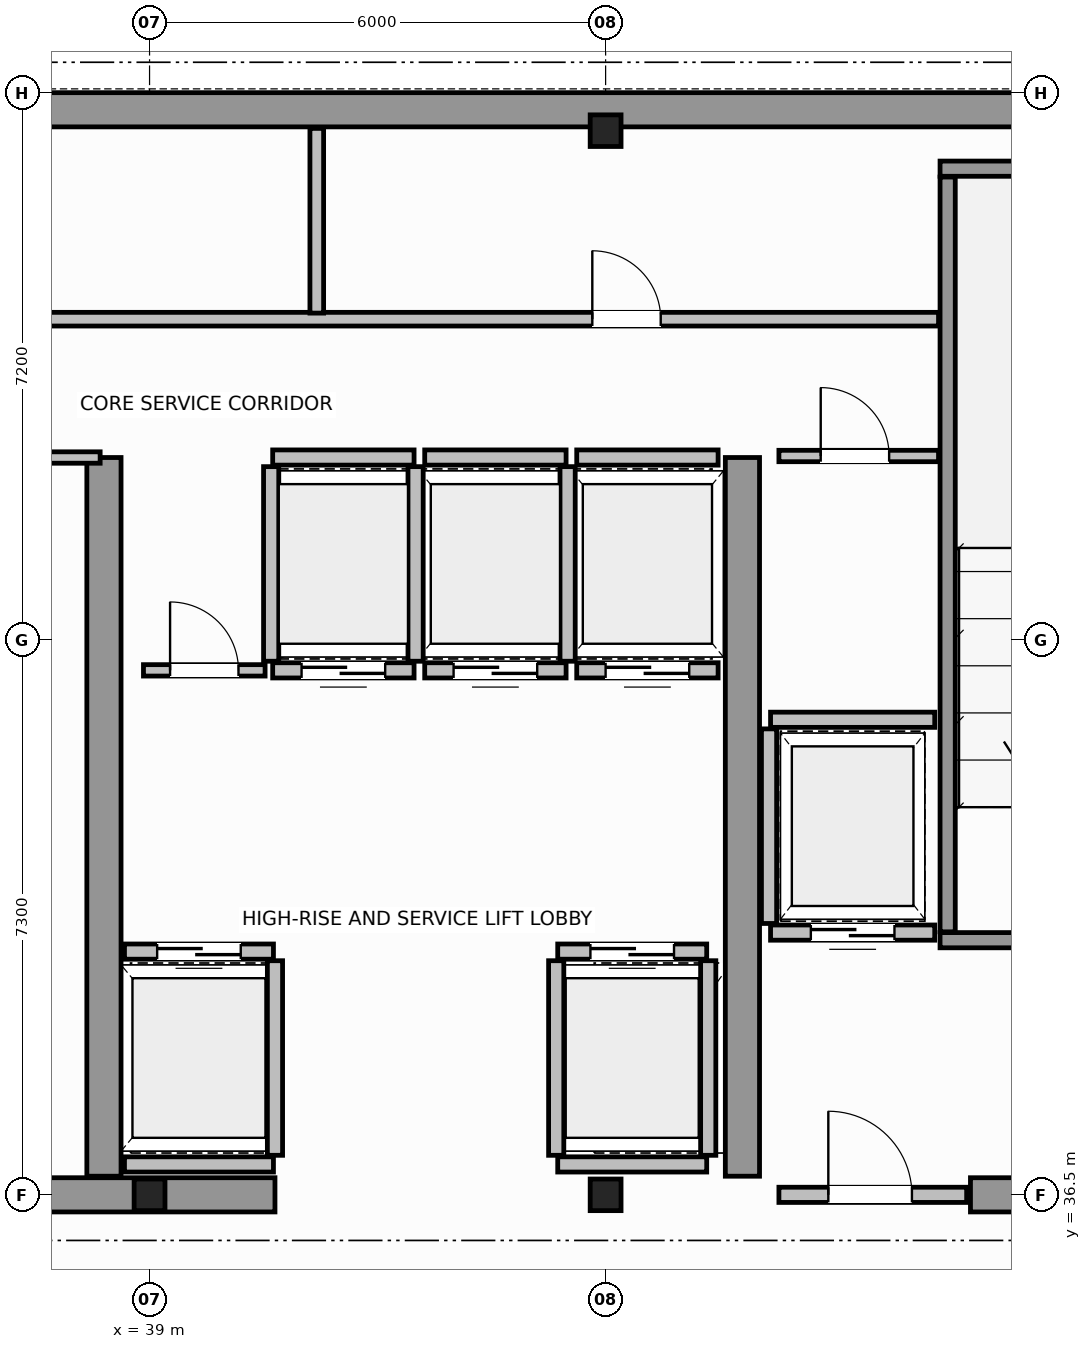
"""IFC4 building model, lengths in metres.
Left out: names, types, materials, properties, quantities, classifications, styles, units other than length and angle.
Written with IfcOpenShell. Run it as: python <this file> out.ifc"""

import sys

from ifc_helpers import new_model, si_unit, direction, frame, frame_2d, origin, origin_2d, place, context, subcontext, project, spatial, rectangle, i_section, extrude, source, transform, mapped, element, fill, save


model = new_model("IFC4")
c1 = context("Model", 3, precision=1e-05, world=origin(), true_north=direction((0.0, 1.0)))
c2 = subcontext(c1, "Body", "Model", "MODEL_VIEW")
j1 = project(units=[si_unit("LENGTHUNIT", "METRE"), si_unit("PLANEANGLEUNIT", "RADIAN")], contexts=[c1])
p1 = place(None, origin())
s1 = spatial("IfcSite", under=j1, at=p1, CompositionType="ELEMENT")
p2 = place(p1, origin())
s2 = spatial("IfcBuilding", under=s1, at=p2, CompositionType="ELEMENT")
p3 = place(p2, frame((0.0, 0.0, 284.0)))
s3 = spatial("IfcBuildingStorey", under=s2, at=p3, CompositionType="ELEMENT", Elevation=284.0)
m1 = source(origin(), c2, "Body", "SweptSolid", [
    extrude(i_section(OverallWidth=0.406, OverallDepth=0.416, WebThickness=0.03, FlangeThickness=0.042, FilletRadius=0.015, at=origin_2d()), origin(), (0.0, 0.0, 1.0), 3.8),
])
for number, where, z_axis, x_axis in (
    (1, (39.0, 36.5, 0.0), (0.0, 0.0, 1.0), (1.0, 0.0, 0.0)),
    (2, (45.0, 36.5, 0.0), (0.0, 0.0, 1.0), (1.0, 0.0, 0.0)),
    (3, (45.0, 50.5, 0.0), (0.0, 0.0, 1.0), (1.0, 0.0, 0.0)),
):
    element("IfcColumn", number, at=place(p3, frame(where, z_axis=z_axis, x_axis=x_axis)), inside=s3, PredefinedType="COLUMN", context=c2, shape_type="MappedRepresentation", body=[
        mapped(m1, transform((0.0, 0.0, 0.0), scale=1.0)),
    ])
p4 = place(p3, frame((34.002, 50.775, 0.0), z_axis=(0.0, 0.0, 1.0), x_axis=(1.0, 0.0, 0.0)))
e4 = element("IfcWall", 4, at=p4, inside=s3, PredefinedType="SHEAR", context=c2, shape_type="SweptSolid", body=[
    extrude(rectangle(XDim=19.769, YDim=0.45, at=frame_2d((9.885, 0.0))), origin(), (0.0, 0.0, 1.0), 3.8),
])
p5 = place(p3, frame((36.15, 36.5, 0.0), z_axis=(0.0, 0.0, 1.0), x_axis=(1.0, 0.0, 0.0)))
e5 = element("IfcWall", 5, at=p5, inside=s3, PredefinedType="SHEAR", context=c2, shape_type="SweptSolid", body=[
    extrude(rectangle(XDim=4.5, YDim=0.45, at=frame_2d((2.25, 0.0))), origin(), (0.0, 0.0, 1.0), 3.8),
])
p6 = place(p3, frame((49.8, 36.5, 0.0), z_axis=(0.0, 0.0, 1.0), x_axis=(1.0, 0.0, 0.0)))
e6 = element("IfcWall", 6, at=p6, inside=s3, PredefinedType="SHEAR", context=c2, shape_type="SweptSolid", body=[
    extrude(rectangle(XDim=3.955, YDim=0.45, at=frame_2d((1.978, 0.0))), origin(), (0.0, 0.0, 1.0), 2.58),
])
for number, where, z_axis, x_axis in (
    (7, (38.4, 36.745, 0.0), (0.0, 0.0, 1.0), (0.0, 1.0, 0.0)),
    (8, (46.8, 36.745, 0.0), (0.0, 0.0, 1.0), (0.0, 1.0, 0.0)),
):
    element("IfcWall", number, at=place(p3, frame(where, z_axis=z_axis, x_axis=x_axis)), inside=s3, PredefinedType="SHEAR", context=c2, shape_type="SweptSolid", body=[
        extrude(rectangle(XDim=9.455, YDim=0.45, at=frame_2d((4.728, 0.0))), origin(), (0.0, 0.0, 1.0), 3.8),
    ])
p7 = place(p3, frame((49.4, 39.85, 0.0), z_axis=(0.0, 0.0, 1.0), x_axis=(1.0, 0.0, 0.0)))
e9 = element("IfcWall", 9, at=p7, inside=s3, PredefinedType="SOLIDWALL", context=c2, shape_type="SweptSolid", body=[
    extrude(rectangle(XDim=4.375, YDim=0.2, at=frame_2d((2.188, 0.0))), origin(), (0.0, 0.0, 1.0), 3.8),
])
p8 = place(p7, frame((1.325, 0.0, 0.0)))
e10 = element("IfcOpeningElement", 10, at=p8, cuts=e9, PredefinedType="OPENING", context=c2, shape_type="SweptSolid", body=[
    extrude(rectangle(XDim=1.1, YDim=2.15, at=frame_2d((0.55, 1.075))), frame((0.0, 0.11, 0.0), z_axis=(0.0, -1.0, 0.0), x_axis=(1.0, 0.0, 0.0)), (0.0, 0.0, 1.0), 0.22),
])
p9 = place(p3, frame((49.4, 50.0, 0.0), z_axis=(0.0, 0.0, 1.0), x_axis=(1.0, 0.0, 0.0)))
e11 = element("IfcWall", 11, at=p9, inside=s3, PredefinedType="SOLIDWALL", context=c2, shape_type="SweptSolid", body=[
    extrude(rectangle(XDim=4.375, YDim=0.2, at=frame_2d((2.188, 0.0))), origin(), (0.0, 0.0, 1.0), 3.8),
])
p10 = place(p3, frame((49.5, 39.96, 0.0), z_axis=(0.0, 0.0, 1.0), x_axis=(0.0, 1.0, 0.0)))
e12 = element("IfcWall", 12, at=p10, inside=s3, PredefinedType="SOLIDWALL", context=c2, shape_type="SweptSolid", body=[
    extrude(rectangle(XDim=9.93, YDim=0.2, at=frame_2d((4.965, 0.0))), origin(), (0.0, 0.0, 1.0), 3.8),
])
p11 = place(p3, frame((47.28, 36.5, 0.0), z_axis=(0.0, 0.0, 1.0), x_axis=(1.0, 0.0, 0.0)))
e13 = element("IfcWall", 13, at=p11, inside=s3, PredefinedType="SOLIDWALL", context=c2, shape_type="SweptSolid", body=[
    extrude(rectangle(XDim=2.47, YDim=0.2, at=frame_2d((1.235, 0.0))), origin(), (0.0, 0.0, 1.0), 2.57),
])
p12 = place(p11, frame((0.65, 0.0, 0.0)))
e14 = element("IfcOpeningElement", 14, at=p12, cuts=e13, PredefinedType="OPENING", context=c2, shape_type="SweptSolid", body=[
    extrude(rectangle(XDim=1.1, YDim=2.15, at=frame_2d((0.55, 1.075))), frame((0.0, 0.11, 0.0), z_axis=(0.0, -1.0, 0.0), x_axis=(1.0, 0.0, 0.0)), (0.0, 0.0, 1.0), 0.22),
])
p13 = place(p3, frame((38.67, 39.7, 0.0), z_axis=(0.0, 0.0, 1.0), x_axis=(1.0, 0.0, 0.0)))
e15 = element("IfcWall", 15, at=p13, inside=s3, PredefinedType="SOLIDWALL", context=c2, shape_type="SweptSolid", body=[
    extrude(rectangle(XDim=1.96, YDim=0.2, at=frame_2d((0.98, 0.0))), origin(), (0.0, 0.0, 1.0), 3.58),
])
p14 = place(p13, frame((0.43, 0.0, 0.0)))
e16 = element("IfcOpeningElement", 16, at=p14, cuts=e15, PredefinedType="OPENING", context=c2, shape_type="SweptSolid", body=[
    extrude(rectangle(XDim=1.1, YDim=2.15, at=frame_2d((0.55, 1.075))), frame((0.0, 0.11, 0.0), z_axis=(0.0, -1.0, 0.0), x_axis=(1.0, 0.0, 0.0)), (0.0, 0.0, 1.0), 0.22),
])
p15 = place(p3, frame((38.67, 36.9, 0.0), z_axis=(0.0, 0.0, 1.0), x_axis=(1.0, 0.0, 0.0)))
e17 = element("IfcWall", 17, at=p15, inside=s3, PredefinedType="SOLIDWALL", context=c2, shape_type="SweptSolid", body=[
    extrude(rectangle(XDim=1.96, YDim=0.2, at=frame_2d((0.98, 0.0))), origin(), (0.0, 0.0, 1.0), 3.58),
])
p16 = place(p3, frame((40.65, 37.02, 0.0), z_axis=(0.0, 0.0, 1.0), x_axis=(0.0, 1.0, 0.0)))
e18 = element("IfcWall", 18, at=p16, inside=s3, PredefinedType="SOLIDWALL", context=c2, shape_type="SweptSolid", body=[
    extrude(rectangle(XDim=2.56, YDim=0.2, at=frame_2d((1.28, 0.0))), origin(), (0.0, 0.0, 1.0), 3.58),
])
p17 = place(p3, frame((44.37, 39.7, 0.0), z_axis=(0.0, 0.0, 1.0), x_axis=(1.0, 0.0, 0.0)))
e19 = element("IfcWall", 19, at=p17, inside=s3, PredefinedType="SOLIDWALL", context=c2, shape_type="SweptSolid", body=[
    extrude(rectangle(XDim=1.96, YDim=0.2, at=frame_2d((0.98, 0.0))), origin(), (0.0, 0.0, 1.0), 3.58),
])
p18 = place(p17, frame((0.43, 0.0, 0.0)))
e20 = element("IfcOpeningElement", 20, at=p18, cuts=e19, PredefinedType="OPENING", context=c2, shape_type="SweptSolid", body=[
    extrude(rectangle(XDim=1.1, YDim=2.15, at=frame_2d((0.55, 1.075))), frame((0.0, 0.11, 0.0), z_axis=(0.0, -1.0, 0.0), x_axis=(1.0, 0.0, 0.0)), (0.0, 0.0, 1.0), 0.22),
])
p19 = place(p3, frame((44.37, 36.9, 0.0), z_axis=(0.0, 0.0, 1.0), x_axis=(1.0, 0.0, 0.0)))
e21 = element("IfcWall", 21, at=p19, inside=s3, PredefinedType="SOLIDWALL", context=c2, shape_type="SweptSolid", body=[
    extrude(rectangle(XDim=1.96, YDim=0.2, at=frame_2d((0.98, 0.0))), origin(), (0.0, 0.0, 1.0), 2.57),
])
for number, where, z_axis, x_axis in (
    (22, (44.35, 37.02, 0.0), (0.0, 0.0, 1.0), (0.0, 1.0, 0.0)),
    (23, (46.35, 37.02, 0.0), (0.0, 0.0, 1.0), (0.0, 1.0, 0.0)),
):
    element("IfcWall", number, at=place(p3, frame(where, z_axis=z_axis, x_axis=x_axis)), inside=s3, PredefinedType="SOLIDWALL", context=c2, shape_type="SweptSolid", body=[
        extrude(rectangle(XDim=2.56, YDim=0.2, at=frame_2d((1.28, 0.0))), origin(), (0.0, 0.0, 1.0), 3.58),
    ])
p20 = place(p3, frame((40.62, 43.4, 0.0), z_axis=(0.0, 0.0, 1.0), x_axis=(1.0, 0.0, 0.0)))
e24 = element("IfcWall", 24, at=p20, inside=s3, PredefinedType="SOLIDWALL", context=c2, shape_type="SweptSolid", body=[
    extrude(rectangle(XDim=1.86, YDim=0.2, at=frame_2d((0.93, 0.0))), origin(), (0.0, 0.0, 1.0), 3.58),
])
p21 = place(p20, frame((0.38, 0.0, 0.0)))
e25 = element("IfcOpeningElement", 25, at=p21, cuts=e24, PredefinedType="OPENING", context=c2, shape_type="SweptSolid", body=[
    extrude(rectangle(XDim=1.1, YDim=2.15, at=frame_2d((0.55, 1.075))), frame((0.0, 0.11, 0.0), z_axis=(0.0, -1.0, 0.0), x_axis=(1.0, 0.0, 0.0)), (0.0, 0.0, 1.0), 0.22),
])
p22 = place(p3, frame((40.62, 46.2, 0.0), z_axis=(0.0, 0.0, 1.0), x_axis=(1.0, 0.0, 0.0)))
e26 = element("IfcWall", 26, at=p22, inside=s3, PredefinedType="SOLIDWALL", context=c2, shape_type="SweptSolid", body=[
    extrude(rectangle(XDim=1.86, YDim=0.2, at=frame_2d((0.93, 0.0))), origin(), (0.0, 0.0, 1.0), 3.58),
])
for number, where, z_axis, x_axis in (
    (27, (40.6, 43.52, 0.0), (0.0, 0.0, 1.0), (0.0, 1.0, 0.0)),
    (28, (42.5, 43.52, 0.0), (0.0, 0.0, 1.0), (0.0, 1.0, 0.0)),
):
    element("IfcWall", number, at=place(p3, frame(where, z_axis=z_axis, x_axis=x_axis)), inside=s3, PredefinedType="SOLIDWALL", context=c2, shape_type="SweptSolid", body=[
        extrude(rectangle(XDim=2.56, YDim=0.2, at=frame_2d((1.28, 0.0))), origin(), (0.0, 0.0, 1.0), 3.58),
    ])
p23 = place(p3, frame((42.62, 43.4, 0.0), z_axis=(0.0, 0.0, 1.0), x_axis=(1.0, 0.0, 0.0)))
e29 = element("IfcWall", 29, at=p23, inside=s3, PredefinedType="SOLIDWALL", context=c2, shape_type="SweptSolid", body=[
    extrude(rectangle(XDim=1.86, YDim=0.2, at=frame_2d((0.93, 0.0))), origin(), (0.0, 0.0, 1.0), 3.58),
])
p24 = place(p23, frame((0.38, 0.0, 0.0)))
e30 = element("IfcOpeningElement", 30, at=p24, cuts=e29, PredefinedType="OPENING", context=c2, shape_type="SweptSolid", body=[
    extrude(rectangle(XDim=1.1, YDim=2.15, at=frame_2d((0.55, 1.075))), frame((0.0, 0.11, 0.0), z_axis=(0.0, -1.0, 0.0), x_axis=(1.0, 0.0, 0.0)), (0.0, 0.0, 1.0), 0.22),
])
p25 = place(p3, frame((42.62, 46.2, 0.0), z_axis=(0.0, 0.0, 1.0), x_axis=(1.0, 0.0, 0.0)))
e31 = element("IfcWall", 31, at=p25, inside=s3, PredefinedType="SOLIDWALL", context=c2, shape_type="SweptSolid", body=[
    extrude(rectangle(XDim=1.86, YDim=0.2, at=frame_2d((0.93, 0.0))), origin(), (0.0, 0.0, 1.0), 3.58),
])
p26 = place(p3, frame((44.5, 43.52, 0.0), z_axis=(0.0, 0.0, 1.0), x_axis=(0.0, 1.0, 0.0)))
e32 = element("IfcWall", 32, at=p26, inside=s3, PredefinedType="SOLIDWALL", context=c2, shape_type="SweptSolid", body=[
    extrude(rectangle(XDim=2.56, YDim=0.2, at=frame_2d((1.28, 0.0))), origin(), (0.0, 0.0, 1.0), 3.58),
])
p27 = place(p3, frame((44.62, 43.4, 0.0), z_axis=(0.0, 0.0, 1.0), x_axis=(1.0, 0.0, 0.0)))
e33 = element("IfcWall", 33, at=p27, inside=s3, PredefinedType="SOLIDWALL", context=c2, shape_type="SweptSolid", body=[
    extrude(rectangle(XDim=1.86, YDim=0.2, at=frame_2d((0.93, 0.0))), origin(), (0.0, 0.0, 1.0), 3.58),
])
p28 = place(p27, frame((0.38, 0.0, 0.0)))
e34 = element("IfcOpeningElement", 34, at=p28, cuts=e33, PredefinedType="OPENING", context=c2, shape_type="SweptSolid", body=[
    extrude(rectangle(XDim=1.1, YDim=2.15, at=frame_2d((0.55, 1.075))), frame((0.0, 0.11, 0.0), z_axis=(0.0, -1.0, 0.0), x_axis=(1.0, 0.0, 0.0)), (0.0, 0.0, 1.0), 0.22),
])
p29 = place(p3, frame((44.62, 46.2, 0.0), z_axis=(0.0, 0.0, 1.0), x_axis=(1.0, 0.0, 0.0)))
e35 = element("IfcWall", 35, at=p29, inside=s3, PredefinedType="SOLIDWALL", context=c2, shape_type="SweptSolid", body=[
    extrude(rectangle(XDim=1.86, YDim=0.2, at=frame_2d((0.93, 0.0))), origin(), (0.0, 0.0, 1.0), 3.58),
])
p30 = place(p3, frame((47.17, 39.95, 0.0), z_axis=(0.0, 0.0, 1.0), x_axis=(1.0, 0.0, 0.0)))
e36 = element("IfcWall", 36, at=p30, inside=s3, PredefinedType="SOLIDWALL", context=c2, shape_type="SweptSolid", body=[
    extrude(rectangle(XDim=2.16, YDim=0.2, at=frame_2d((1.08, 0.0))), origin(), (0.0, 0.0, 1.0), 3.58),
])
p31 = place(p30, frame((0.53, 0.0, 0.0)))
e37 = element("IfcOpeningElement", 37, at=p31, cuts=e36, PredefinedType="OPENING", context=c2, shape_type="SweptSolid", body=[
    extrude(rectangle(XDim=1.1, YDim=2.15, at=frame_2d((0.55, 1.075))), frame((0.0, 0.11, 0.0), z_axis=(0.0, -1.0, 0.0), x_axis=(1.0, 0.0, 0.0)), (0.0, 0.0, 1.0), 0.22),
])
p32 = place(p3, frame((47.17, 42.75, 0.0), z_axis=(0.0, 0.0, 1.0), x_axis=(1.0, 0.0, 0.0)))
e38 = element("IfcWall", 38, at=p32, inside=s3, PredefinedType="SOLIDWALL", context=c2, shape_type="SweptSolid", body=[
    extrude(rectangle(XDim=2.16, YDim=0.2, at=frame_2d((1.08, 0.0))), origin(), (0.0, 0.0, 1.0), 3.58),
])
p33 = place(p3, frame((47.15, 40.07, 0.0), z_axis=(0.0, 0.0, 1.0), x_axis=(0.0, 1.0, 0.0)))
e39 = element("IfcWall", 39, at=p33, inside=s3, PredefinedType="SOLIDWALL", context=c2, shape_type="SweptSolid", body=[
    extrude(rectangle(XDim=2.56, YDim=0.2, at=frame_2d((1.28, 0.0))), origin(), (0.0, 0.0, 1.0), 3.58),
])
p34 = place(p3, frame((29.85, 46.2, 0.0), z_axis=(0.0, 0.0, 1.0), x_axis=(1.0, 0.0, 0.0)))
e40 = element("IfcWall", 40, at=p34, inside=s3, PredefinedType="PARTITIONING", context=c2, shape_type="SweptSolid", body=[
    extrude(rectangle(XDim=8.5, YDim=0.15, at=frame_2d((4.25, 0.0))), origin(), (0.0, 0.0, 1.0), 3.58),
])
p35 = place(p3, frame((47.28, 46.22, 0.0), z_axis=(0.0, 0.0, 1.0), x_axis=(1.0, 0.0, 0.0)))
e41 = element("IfcWall", 41, at=p35, inside=s3, PredefinedType="PARTITIONING", context=c2, shape_type="SweptSolid", body=[
    extrude(rectangle(XDim=2.1, YDim=0.15, at=frame_2d((1.05, 0.0))), origin(), (0.0, 0.0, 1.0), 3.58),
])
p36 = place(p35, frame((0.55, 0.0, 0.0)))
e42 = element("IfcOpeningElement", 42, at=p36, cuts=e41, PredefinedType="OPENING", context=c2, shape_type="SweptSolid", body=[
    extrude(rectangle(XDim=0.9, YDim=2.1, at=frame_2d((0.45, 1.05))), frame((0.0, 0.085, 0.0), z_axis=(0.0, -1.0, 0.0), x_axis=(1.0, 0.0, 0.0)), (0.0, 0.0, 1.0), 0.17),
])
p37 = place(p3, frame((38.92, 43.4, 0.0), z_axis=(0.0, 0.0, 1.0), x_axis=(1.0, 0.0, 0.0)))
e43 = element("IfcWall", 43, at=p37, inside=s3, PredefinedType="PARTITIONING", context=c2, shape_type="SweptSolid", body=[
    extrude(rectangle(XDim=1.6, YDim=0.15, at=frame_2d((0.8, 0.0))), origin(), (0.0, 0.0, 1.0), 3.58),
])
p38 = place(p37, frame((0.35, 0.0, 0.0)))
e44 = element("IfcOpeningElement", 44, at=p38, cuts=e43, PredefinedType="OPENING", context=c2, shape_type="SweptSolid", body=[
    extrude(rectangle(XDim=0.9, YDim=2.1, at=frame_2d((0.45, 1.05))), frame((0.0, 0.085, 0.0), z_axis=(0.0, -1.0, 0.0), x_axis=(1.0, 0.0, 0.0)), (0.0, 0.0, 1.0), 0.17),
])
p39 = place(p3, frame((18.62, 48.02, 0.0), z_axis=(0.0, 0.0, 1.0), x_axis=(1.0, 0.0, 0.0)))
e45 = element("IfcWall", 45, at=p39, inside=s3, PredefinedType="PLUMBINGWALL", context=c2, shape_type="SweptSolid", body=[
    extrude(rectangle(XDim=30.76, YDim=0.18, at=frame_2d((15.38, 0.0))), origin(), (0.0, 0.0, 1.0), 3.58),
])
p40 = place(p39, frame((1.955, 0.0, 0.0)))
e46 = element("IfcOpeningElement", 46, at=p40, cuts=e45, PredefinedType="OPENING", context=c2, shape_type="SweptSolid", body=[
    extrude(rectangle(XDim=0.9, YDim=2.15, at=frame_2d((0.45, 1.075))), frame((0.0, 0.1, 0.0), z_axis=(0.0, -1.0, 0.0), x_axis=(1.0, 0.0, 0.0)), (0.0, 0.0, 1.0), 0.2),
])
p41 = place(p39, frame((8.03, 0.0, 0.0)))
e47 = element("IfcOpeningElement", 47, at=p41, cuts=e45, PredefinedType="OPENING", context=c2, shape_type="SweptSolid", body=[
    extrude(rectangle(XDim=0.9, YDim=2.15, at=frame_2d((0.45, 1.075))), frame((0.0, 0.1, 0.0), z_axis=(0.0, -1.0, 0.0), x_axis=(1.0, 0.0, 0.0)), (0.0, 0.0, 1.0), 0.2),
])
p42 = place(p39, frame((16.93, 0.0, 0.0)))
e48 = element("IfcOpeningElement", 48, at=p42, cuts=e45, PredefinedType="OPENING", context=c2, shape_type="SweptSolid", body=[
    extrude(rectangle(XDim=0.9, YDim=2.15, at=frame_2d((0.45, 1.075))), frame((0.0, 0.1, 0.0), z_axis=(0.0, -1.0, 0.0), x_axis=(1.0, 0.0, 0.0)), (0.0, 0.0, 1.0), 0.2),
])
p43 = place(p39, frame((26.205, 0.0, 0.0)))
e49 = element("IfcOpeningElement", 49, at=p43, cuts=e45, PredefinedType="OPENING", context=c2, shape_type="SweptSolid", body=[
    extrude(rectangle(XDim=0.9, YDim=2.15, at=frame_2d((0.45, 1.075))), frame((0.0, 0.1, 0.0), z_axis=(0.0, -1.0, 0.0), x_axis=(1.0, 0.0, 0.0)), (0.0, 0.0, 1.0), 0.2),
])
p44 = place(p3, frame((41.2, 48.1, 0.0), z_axis=(0.0, 0.0, 1.0), x_axis=(0.0, 1.0, 0.0)))
e50 = element("IfcWall", 50, at=p44, inside=s3, PredefinedType="PLUMBINGWALL", context=c2, shape_type="SweptSolid", body=[
    extrude(rectangle(XDim=2.43, YDim=0.18, at=frame_2d((1.215, 0.0))), origin(), (0.0, 0.0, 1.0), 3.58),
])
m2 = source(origin(), c2, "Body", "SweptSolid", [
    extrude(rectangle(XDim=1.1, YDim=2.15, at=frame_2d((0.55, 1.075))), frame((0.0, 0.025, 0.0), z_axis=(0.0, -1.0, 0.0), x_axis=(1.0, 0.0, 0.0)), (0.0, 0.0, 1.0), 0.05),
])
p45 = place(p12, origin())
e51 = element("IfcDoor", 51, at=p45, inside=s3, OperationType="SINGLE_SWING_LEFT", PredefinedType="DOOR", context=c2, shape_type="MappedRepresentation", body=[
    mapped(m2, transform((0.0, 0.0, 0.0), scale=1.0)),
])
fill(e14, e51)
p46 = place(p14, origin())
e52 = element("IfcDoor", 52, at=p46, inside=s3, OperationType="DOUBLE_DOOR_SLIDING", PredefinedType="DOOR", context=c2, shape_type="MappedRepresentation", body=[
    mapped(m2, transform((0.0, 0.0, 0.0), scale=1.0)),
])
fill(e16, e52)
p47 = place(p18, origin())
e53 = element("IfcDoor", 53, at=p47, inside=s3, OperationType="DOUBLE_DOOR_SLIDING", PredefinedType="DOOR", context=c2, shape_type="MappedRepresentation", body=[
    mapped(m2, transform((0.0, 0.0, 0.0), scale=1.0)),
])
fill(e20, e53)
p48 = place(p21, origin())
e54 = element("IfcDoor", 54, at=p48, inside=s3, OperationType="DOUBLE_DOOR_SLIDING", PredefinedType="DOOR", context=c2, shape_type="MappedRepresentation", body=[
    mapped(m2, transform((0.0, 0.0, 0.0), scale=1.0)),
])
fill(e25, e54)
p49 = place(p24, origin())
e55 = element("IfcDoor", 55, at=p49, inside=s3, OperationType="DOUBLE_DOOR_SLIDING", PredefinedType="DOOR", context=c2, shape_type="MappedRepresentation", body=[
    mapped(m2, transform((0.0, 0.0, 0.0), scale=1.0)),
])
fill(e30, e55)
p50 = place(p28, origin())
e56 = element("IfcDoor", 56, at=p50, inside=s3, OperationType="DOUBLE_DOOR_SLIDING", PredefinedType="DOOR", context=c2, shape_type="MappedRepresentation", body=[
    mapped(m2, transform((0.0, 0.0, 0.0), scale=1.0)),
])
fill(e34, e56)
p51 = place(p31, origin())
e57 = element("IfcDoor", 57, at=p51, inside=s3, OperationType="DOUBLE_DOOR_SLIDING", PredefinedType="DOOR", context=c2, shape_type="MappedRepresentation", body=[
    mapped(m2, transform((0.0, 0.0, 0.0), scale=1.0)),
])
fill(e37, e57)
m3 = source(origin(), c2, "Body", "SweptSolid", [
    extrude(rectangle(XDim=0.9, YDim=2.1, at=frame_2d((0.45, 1.05))), frame((0.0, 0.025, 0.0), z_axis=(0.0, -1.0, 0.0), x_axis=(1.0, 0.0, 0.0)), (0.0, 0.0, 1.0), 0.05),
])
p52 = place(p36, origin())
e58 = element("IfcDoor", 58, at=p52, inside=s3, OperationType="SINGLE_SWING_RIGHT", PredefinedType="DOOR", context=c2, shape_type="MappedRepresentation", body=[
    mapped(m3, transform((0.0, 0.0, 0.0), scale=1.0)),
])
fill(e42, e58)
p53 = place(p38, origin())
e59 = element("IfcDoor", 59, at=p53, inside=s3, OperationType="SINGLE_SWING_LEFT", PredefinedType="DOOR", context=c2, shape_type="MappedRepresentation", body=[
    mapped(m3, transform((0.0, 0.0, 0.0), scale=1.0)),
])
fill(e44, e59)
m4 = source(origin(), c2, "Body", "SweptSolid", [
    extrude(rectangle(XDim=0.9, YDim=2.15, at=frame_2d((0.45, 1.075))), frame((0.0, 0.025, 0.0), z_axis=(0.0, -1.0, 0.0), x_axis=(1.0, 0.0, 0.0)), (0.0, 0.0, 1.0), 0.05),
])
p54 = place(p43, origin())
e60 = element("IfcDoor", 60, at=p54, inside=s3, OperationType="SINGLE_SWING_RIGHT", PredefinedType="DOOR", context=c2, shape_type="MappedRepresentation", body=[
    mapped(m4, transform((0.0, 0.0, 0.0), scale=1.0)),
])
fill(e49, e60)
save(model, sys.argv[1])
